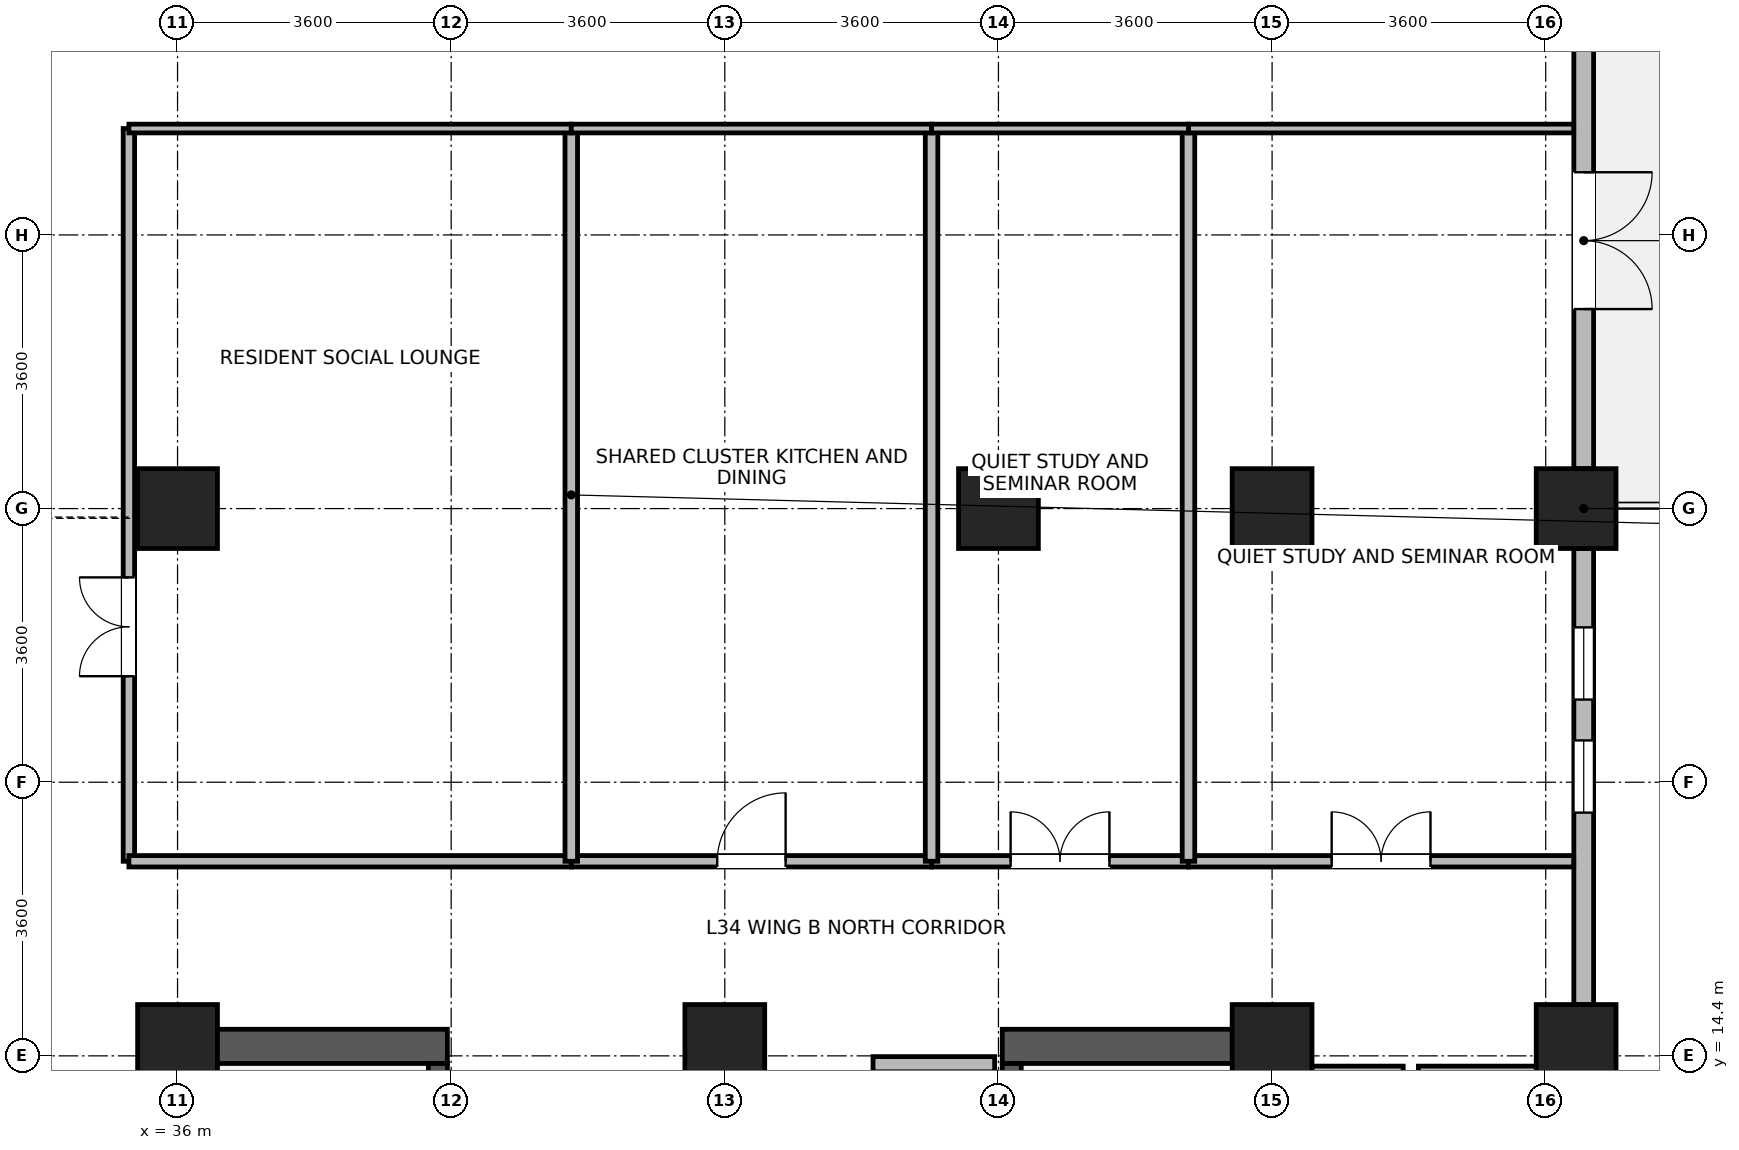
"""IFC4 building model, lengths in metres.
Left out: names, types, materials, properties, quantities, classifications, styles, units other than length and angle.
Written with IfcOpenShell. Run it as: python <this file> out.ifc"""

import sys

from ifc_helpers import new_model, si_unit, direction, frame, frame_2d, origin, origin_2d, place, context, subcontext, project, spatial, rectangle, extrude, source, transform, mapped, element, fill, save


model = new_model("IFC4")
c1 = context("Model", 3, precision=1e-05, world=origin(), true_north=direction((0.0, 1.0)))
c2 = subcontext(c1, "Body", "Model", "MODEL_VIEW")
j1 = project(units=[si_unit("LENGTHUNIT", "METRE"), si_unit("PLANEANGLEUNIT", "RADIAN")], contexts=[c1])
p1 = place(None, origin())
s1 = spatial("IfcSite", under=j1, at=p1, CompositionType="ELEMENT")
p2 = place(p1, origin())
s2 = spatial("IfcBuilding", under=s1, at=p2, CompositionType="ELEMENT")
p3 = place(p2, frame((0.0, 0.0, 135.6)))
s3 = spatial("IfcBuildingStorey", under=s2, at=p3, CompositionType="ELEMENT", Elevation=135.6)
for number, where, z_axis, x_axis in (
    (1, (36.125, 6.85, 0.0), (0.0, 0.0, 1.0), (0.0, 1.0, 0.0)),
    (2, (50.275, 6.85, 0.0), (0.0, 0.0, 1.0), (0.0, 1.0, 0.0)),
):
    element("IfcWall", number, at=place(p3, frame(where, z_axis=z_axis, x_axis=x_axis)), inside=s3, PredefinedType="SHEAR", context=c2, shape_type="SweptSolid", body=[
        extrude(rectangle(XDim=7.9, YDim=0.45, at=frame_2d((3.95, 0.0))), origin(), (0.0, 0.0, 1.0), 4.36),
    ])
for number, where, z_axis, x_axis in (
    (3, (36.35, 14.525, 0.0), (0.0, 0.0, 1.0), (1.0, 0.0, 0.0)),
    (4, (46.85, 14.525, 0.0), (0.0, 0.0, 1.0), (1.0, 0.0, 0.0)),
):
    element("IfcWall", number, at=place(p3, frame(where, z_axis=z_axis, x_axis=x_axis)), inside=s3, PredefinedType="SHEAR", context=c2, shape_type="SweptSolid", body=[
        extrude(rectangle(XDim=3.2, YDim=0.45, at=frame_2d((1.6, 0.0))), origin(), (0.0, 0.0, 1.0), 4.36),
    ])
p4 = place(p3, frame((39.425, 7.3, 0.0), z_axis=(0.0, 0.0, 1.0), x_axis=(0.0, 1.0, 0.0)))
e5 = element("IfcWall", 5, at=p4, inside=s3, PredefinedType="SHEAR", context=c2, shape_type="SweptSolid", body=[
    extrude(rectangle(XDim=7.0, YDim=0.25, at=frame_2d((3.5, 0.0))), origin(), (0.0, 0.0, 1.0), 4.36),
])
p5 = place(p4, frame((0.15, 0.0, 0.0)))
e6 = element("IfcOpeningElement", 6, at=p5, cuts=e5, PredefinedType="OPENING", context=c2, shape_type="SweptSolid", body=[
    extrude(rectangle(XDim=1.1, YDim=2.08, at=frame_2d((0.55, 1.04))), frame((0.0, 0.135, 0.0), z_axis=(0.0, -1.0, 0.0), x_axis=(1.0, 0.0, 0.0)), (0.0, 0.0, 1.0), 0.27),
])
p6 = place(p3, frame((46.975, 7.3, 0.0), z_axis=(0.0, 0.0, 1.0), x_axis=(0.0, 1.0, 0.0)))
e7 = element("IfcWall", 7, at=p6, inside=s3, PredefinedType="SHEAR", context=c2, shape_type="SweptSolid", body=[
    extrude(rectangle(XDim=7.0, YDim=0.25, at=frame_2d((3.5, 0.0))), origin(), (0.0, 0.0, 1.0), 4.36),
])
p7 = place(p6, frame((0.15, 0.0, 0.0)))
e8 = element("IfcOpeningElement", 8, at=p7, cuts=e7, PredefinedType="OPENING", context=c2, shape_type="SweptSolid", body=[
    extrude(rectangle(XDim=1.1, YDim=2.08, at=frame_2d((0.55, 1.04))), frame((0.0, 0.135, 0.0), z_axis=(0.0, -1.0, 0.0), x_axis=(1.0, 0.0, 0.0)), (0.0, 0.0, 1.0), 0.27),
])
m1 = source(origin(), c2, "Body", "SweptSolid", [
    extrude(rectangle(XDim=1.05, YDim=1.05, at=origin_2d()), origin(), (0.0, 0.0, 1.0), 4.6),
])
for number, where, z_axis, x_axis in (
    (9, (36.0, 21.6, 0.0), (0.0, 0.0, 1.0), (1.0, 0.0, 0.0)),
    (10, (46.8, 21.6, 0.0), (0.0, 0.0, 1.0), (1.0, 0.0, 0.0)),
    (11, (36.0, 14.55, 0.0), (0.0, 0.0, 1.0), (1.0, 0.0, 0.0)),
    (12, (43.2, 14.55, 0.0), (0.0, 0.0, 1.0), (1.0, 0.0, 0.0)),
    (13, (50.4, 14.55, 0.0), (0.0, 0.0, 1.0), (1.0, 0.0, 0.0)),
    (14, (50.4, 21.6, 0.0), (0.0, 0.0, 1.0), (1.0, 0.0, 0.0)),
    (15, (54.4, 14.55, 0.0), (0.0, 0.0, 1.0), (1.0, 0.0, 0.0)),
    (16, (54.4, 21.6, 0.0), (0.0, 0.0, 1.0), (1.0, 0.0, 0.0)),
):
    element("IfcColumn", number, at=place(p3, frame(where, z_axis=z_axis, x_axis=x_axis)), inside=s3, PredefinedType="COLUMN", context=c2, shape_type="MappedRepresentation", body=[
        mapped(m1, transform((0.0, 0.0, 0.0), x_axis=(1.0, 0.0, 0.0), y_axis=(0.0, 1.0, 0.0), z_axis=(0.0, 0.0, 1.0), scale=1.0)),
    ])
p8 = place(p3, frame((54.5, 21.074, 0.0), z_axis=(0.0, 0.0, 1.0), x_axis=(0.0, -1.0, 0.0)))
e17 = element("IfcWall", 17, at=p8, inside=s3, PredefinedType="STANDARD", context=c2, shape_type="SweptSolid", body=[
    extrude(rectangle(XDim=5.998, YDim=0.26, at=frame_2d((2.999, 0.0))), origin(), (0.0, 0.0, 1.0), 3.89),
])
p9 = place(p8, frame((2.524, 0.0, 0.85)))
e18 = element("IfcOpeningElement", 18, at=p9, cuts=e17, PredefinedType="OPENING", context=c2, shape_type="SweptSolid", body=[
    extrude(rectangle(XDim=0.95, YDim=1.75, at=frame_2d((0.475, 0.875))), frame((0.0, 0.14, 0.0), z_axis=(0.0, -1.0, 0.0), x_axis=(1.0, 0.0, 0.0)), (0.0, 0.0, 1.0), 0.28),
])
p10 = place(p8, frame((1.037, 0.0, 0.85)))
e19 = element("IfcOpeningElement", 19, at=p10, cuts=e17, PredefinedType="OPENING", context=c2, shape_type="SweptSolid", body=[
    extrude(rectangle(XDim=0.95, YDim=1.75, at=frame_2d((0.475, 0.875))), frame((0.0, 0.14, 0.0), z_axis=(0.0, -1.0, 0.0), x_axis=(1.0, 0.0, 0.0)), (0.0, 0.0, 1.0), 0.28),
])
p11 = place(p3, frame((54.5, 28.124, 0.0), z_axis=(0.0, 0.0, 1.0), x_axis=(0.0, -1.0, 0.0)))
e20 = element("IfcWall", 20, at=p11, inside=s3, PredefinedType="STANDARD", context=c2, shape_type="SweptSolid", body=[
    extrude(rectangle(XDim=5.998, YDim=0.26, at=frame_2d((2.999, 0.0))), origin(), (0.0, 0.0, 1.0), 3.89),
])
p12 = place(p11, frame((2.099, 0.0, 0.0)))
e21 = element("IfcOpeningElement", 21, at=p12, cuts=e20, PredefinedType="OPENING", context=c2, shape_type="SweptSolid", body=[
    extrude(rectangle(XDim=1.8, YDim=2.2, at=frame_2d((0.9, 1.1))), frame((0.0, 0.14, 0.0), z_axis=(0.0, -1.0, 0.0), x_axis=(1.0, 0.0, 0.0)), (0.0, 0.0, 1.0), 0.28),
])
p13 = place(p3, frame((50.475, 14.165, 0.0), z_axis=(0.0, 0.0, 1.0), x_axis=(1.0, 0.0, 0.0)))
e22 = element("IfcWall", 22, at=p13, inside=s3, PredefinedType="PARTITIONING", context=c2, shape_type="SweptSolid", body=[
    extrude(rectangle(XDim=1.65, YDim=0.2, at=frame_2d((0.825, 0.0))), origin(), (0.0, 0.0, 1.0), 4.34),
])
p14 = place(p3, frame((52.325, 14.165, 0.0), z_axis=(0.0, 0.0, 1.0), x_axis=(1.0, 0.0, 0.0)))
e23 = element("IfcWall", 23, at=p14, inside=s3, PredefinedType="PARTITIONING", context=c2, shape_type="SweptSolid", body=[
    extrude(rectangle(XDim=1.65, YDim=0.2, at=frame_2d((0.825, 0.0))), origin(), (0.0, 0.0, 1.0), 4.34),
])
p15 = place(p3, frame((45.15, 14.29, 0.0), z_axis=(0.0, 0.0, 1.0), x_axis=(1.0, 0.0, 0.0)))
e24 = element("IfcWall", 24, at=p15, inside=s3, PredefinedType="PARTITIONING", context=c2, shape_type="SweptSolid", body=[
    extrude(rectangle(XDim=1.6, YDim=0.2, at=frame_2d((0.8, 0.0))), origin(), (0.0, 0.0, 1.0), 3.34),
])
p16 = place(p3, frame((35.36, 16.96, 0.0), z_axis=(0.0, 0.0, 1.0), x_axis=(0.0, 1.0, 0.0)))
e25 = element("IfcWall", 25, at=p16, inside=s3, PredefinedType="PARTITIONING", context=c2, shape_type="SweptSolid", body=[
    extrude(rectangle(XDim=9.64, YDim=0.15, at=frame_2d((4.82, 0.0))), origin(), (0.0, 0.0, 1.0), 4.34),
])
p17 = place(p16, frame((2.435, 0.0, 0.0)))
e26 = element("IfcOpeningElement", 26, at=p17, cuts=e25, PredefinedType="OPENING", context=c2, shape_type="SweptSolid", body=[
    extrude(rectangle(XDim=1.3, YDim=2.12, at=frame_2d((0.65, 1.06))), frame((0.0, 0.085, 0.0), z_axis=(0.0, -1.0, 0.0), x_axis=(1.0, 0.0, 0.0)), (0.0, 0.0, 1.0), 0.17),
])
p18 = place(p3, frame((35.36, 16.96, 0.0), z_axis=(0.0, 0.0, 1.0), x_axis=(1.0, 0.0, 0.0)))
e27 = element("IfcWall", 27, at=p18, inside=s3, PredefinedType="PARTITIONING", context=c2, shape_type="SweptSolid", body=[
    extrude(rectangle(XDim=5.82, YDim=0.15, at=frame_2d((2.91, 0.0))), origin(), (0.0, 0.0, 1.0), 4.34),
])
p19 = place(p3, frame((49.3, 16.96, 0.0), z_axis=(0.0, 0.0, 1.0), x_axis=(1.0, 0.0, 0.0)))
e28 = element("IfcWall", 28, at=p19, inside=s3, PredefinedType="PARTITIONING", context=c2, shape_type="SweptSolid", body=[
    extrude(rectangle(XDim=5.068, YDim=0.15, at=frame_2d((2.534, 0.0))), origin(), (0.0, 0.0, 1.0), 4.34),
])
p20 = place(p19, frame((1.884, 0.0, 0.0)))
e29 = element("IfcOpeningElement", 29, at=p20, cuts=e28, PredefinedType="OPENING", context=c2, shape_type="SweptSolid", body=[
    extrude(rectangle(XDim=1.3, YDim=2.12, at=frame_2d((0.65, 1.06))), frame((0.0, 0.085, 0.0), z_axis=(0.0, -1.0, 0.0), x_axis=(1.0, 0.0, 0.0)), (0.0, 0.0, 1.0), 0.17),
])
p21 = place(p3, frame((41.18, 16.96, 0.0), z_axis=(0.0, 0.0, 1.0), x_axis=(1.0, 0.0, 0.0)))
e30 = element("IfcWall", 30, at=p21, inside=s3, PredefinedType="PARTITIONING", context=c2, shape_type="SweptSolid", body=[
    extrude(rectangle(XDim=4.74, YDim=0.15, at=frame_2d((2.37, 0.0))), origin(), (0.0, 0.0, 1.0), 4.34),
])
p22 = place(p21, frame((1.92, 0.0, 0.0)))
e31 = element("IfcOpeningElement", 31, at=p22, cuts=e30, PredefinedType="OPENING", context=c2, shape_type="SweptSolid", body=[
    extrude(rectangle(XDim=0.9, YDim=2.08, at=frame_2d((0.45, 1.04))), frame((0.0, 0.085, 0.0), z_axis=(0.0, -1.0, 0.0), x_axis=(1.0, 0.0, 0.0)), (0.0, 0.0, 1.0), 0.17),
])
p23 = place(p3, frame((45.92, 16.96, 0.0), z_axis=(0.0, 0.0, 1.0), x_axis=(1.0, 0.0, 0.0)))
e32 = element("IfcWall", 32, at=p23, inside=s3, PredefinedType="PARTITIONING", context=c2, shape_type="SweptSolid", body=[
    extrude(rectangle(XDim=3.38, YDim=0.15, at=frame_2d((1.69, 0.0))), origin(), (0.0, 0.0, 1.0), 4.34),
])
p24 = place(p23, frame((1.04, 0.0, 0.0)))
e33 = element("IfcOpeningElement", 33, at=p24, cuts=e32, PredefinedType="OPENING", context=c2, shape_type="SweptSolid", body=[
    extrude(rectangle(XDim=1.3, YDim=2.12, at=frame_2d((0.65, 1.06))), frame((0.0, 0.085, 0.0), z_axis=(0.0, -1.0, 0.0), x_axis=(1.0, 0.0, 0.0)), (0.0, 0.0, 1.0), 0.17),
])
for number, where, z_axis, x_axis in (
    (34, (41.18, 16.96, 0.0), (0.0, 0.0, 1.0), (0.0, 1.0, 0.0)),
    (35, (45.92, 16.96, 0.0), (0.0, 0.0, 1.0), (0.0, 1.0, 0.0)),
    (36, (49.3, 16.96, 0.0), (0.0, 0.0, 1.0), (0.0, 1.0, 0.0)),
):
    element("IfcWall", number, at=place(p3, frame(where, z_axis=z_axis, x_axis=x_axis)), inside=s3, PredefinedType="PARTITIONING", context=c2, shape_type="SweptSolid", body=[
        extrude(rectangle(XDim=9.64, YDim=0.165, at=frame_2d((4.82, 0.0))), origin(), (0.0, 0.0, 1.0), 4.34),
    ])
p25 = place(p3, frame((35.36, 26.6, 0.0), z_axis=(0.0, 0.0, 1.0), x_axis=(1.0, 0.0, 0.0)))
e37 = element("IfcWall", 37, at=p25, inside=s3, PredefinedType="PARTITIONING", context=c2, shape_type="SweptSolid", body=[
    extrude(rectangle(XDim=5.82, YDim=0.115, at=frame_2d((2.91, 0.0))), origin(), (0.0, 0.0, 1.0), 4.34),
])
p26 = place(p3, frame((49.3, 26.6, 0.0), z_axis=(0.0, 0.0, 1.0), x_axis=(1.0, 0.0, 0.0)))
e38 = element("IfcWall", 38, at=p26, inside=s3, PredefinedType="PARTITIONING", context=c2, shape_type="SweptSolid", body=[
    extrude(rectangle(XDim=5.068, YDim=0.115, at=frame_2d((2.534, 0.0))), origin(), (0.0, 0.0, 1.0), 4.34),
])
p27 = place(p3, frame((41.18, 26.6, 0.0), z_axis=(0.0, 0.0, 1.0), x_axis=(1.0, 0.0, 0.0)))
e39 = element("IfcWall", 39, at=p27, inside=s3, PredefinedType="PARTITIONING", context=c2, shape_type="SweptSolid", body=[
    extrude(rectangle(XDim=4.74, YDim=0.115, at=frame_2d((2.37, 0.0))), origin(), (0.0, 0.0, 1.0), 4.34),
])
p28 = place(p3, frame((45.92, 26.6, 0.0), z_axis=(0.0, 0.0, 1.0), x_axis=(1.0, 0.0, 0.0)))
e40 = element("IfcWall", 40, at=p28, inside=s3, PredefinedType="PARTITIONING", context=c2, shape_type="SweptSolid", body=[
    extrude(rectangle(XDim=3.38, YDim=0.115, at=frame_2d((1.69, 0.0))), origin(), (0.0, 0.0, 1.0), 4.34),
])
p29 = place(p9, origin())
e41 = element("IfcWindow", 41, at=p29, inside=s3, PartitioningType="SINGLE_PANEL", PredefinedType="WINDOW", context=c2, shape_type="SweptSolid", body=[
    extrude(rectangle(XDim=0.95, YDim=1.75, at=frame_2d((0.475, 0.875))), frame((0.0, 0.03, 0.0), z_axis=(0.0, -1.0, 0.0), x_axis=(1.0, 0.0, 0.0)), (0.0, 0.0, 1.0), 0.06),
])
fill(e18, e41)
p30 = place(p10, origin())
e42 = element("IfcWindow", 42, at=p30, inside=s3, PartitioningType="SINGLE_PANEL", PredefinedType="WINDOW", context=c2, shape_type="SweptSolid", body=[
    extrude(rectangle(XDim=0.95, YDim=1.75, at=frame_2d((0.475, 0.875))), frame((0.0, 0.03, 0.0), z_axis=(0.0, -1.0, 0.0), x_axis=(1.0, 0.0, 0.0)), (0.0, 0.0, 1.0), 0.06),
])
fill(e19, e42)
p31 = place(p12, origin())
e43 = element("IfcDoor", 43, at=p31, inside=s3, OperationType="DOUBLE_DOOR_SINGLE_SWING", PredefinedType="DOOR", context=c2, shape_type="SweptSolid", body=[
    extrude(rectangle(XDim=1.8, YDim=2.2, at=frame_2d((0.9, 1.1))), frame((0.0, 0.025, 0.0), z_axis=(0.0, -1.0, 0.0), x_axis=(1.0, 0.0, 0.0)), (0.0, 0.0, 1.0), 0.05),
])
fill(e21, e43)
p32 = place(p17, origin())
e44 = element("IfcDoor", 44, at=p32, inside=s3, OperationType="DOUBLE_DOOR_SINGLE_SWING", PredefinedType="DOOR", context=c2, shape_type="SweptSolid", body=[
    extrude(rectangle(XDim=1.3, YDim=2.12, at=frame_2d((0.65, 1.06))), frame((0.0, 0.025, 0.0), z_axis=(0.0, -1.0, 0.0), x_axis=(1.0, 0.0, 0.0)), (0.0, 0.0, 1.0), 0.05),
])
fill(e26, e44)
p33 = place(p20, origin())
e45 = element("IfcDoor", 45, at=p33, inside=s3, OperationType="DOUBLE_DOOR_SINGLE_SWING", PredefinedType="DOOR", context=c2, shape_type="SweptSolid", body=[
    extrude(rectangle(XDim=1.3, YDim=2.12, at=frame_2d((0.65, 1.06))), frame((0.0, 0.025, 0.0), z_axis=(0.0, -1.0, 0.0), x_axis=(1.0, 0.0, 0.0)), (0.0, 0.0, 1.0), 0.05),
])
fill(e29, e45)
p34 = place(p22, origin())
e46 = element("IfcDoor", 46, at=p34, inside=s3, OperationType="SINGLE_SWING_RIGHT", PredefinedType="DOOR", context=c2, shape_type="SweptSolid", body=[
    extrude(rectangle(XDim=0.9, YDim=2.08, at=frame_2d((0.45, 1.04))), frame((0.0, 0.025, 0.0), z_axis=(0.0, -1.0, 0.0), x_axis=(1.0, 0.0, 0.0)), (0.0, 0.0, 1.0), 0.05),
])
fill(e31, e46)
p35 = place(p24, origin())
e47 = element("IfcDoor", 47, at=p35, inside=s3, OperationType="DOUBLE_DOOR_SINGLE_SWING", PredefinedType="DOOR", context=c2, shape_type="SweptSolid", body=[
    extrude(rectangle(XDim=1.3, YDim=2.12, at=frame_2d((0.65, 1.06))), frame((0.0, 0.025, 0.0), z_axis=(0.0, -1.0, 0.0), x_axis=(1.0, 0.0, 0.0)), (0.0, 0.0, 1.0), 0.05),
])
fill(e33, e47)
save(model, sys.argv[1])
